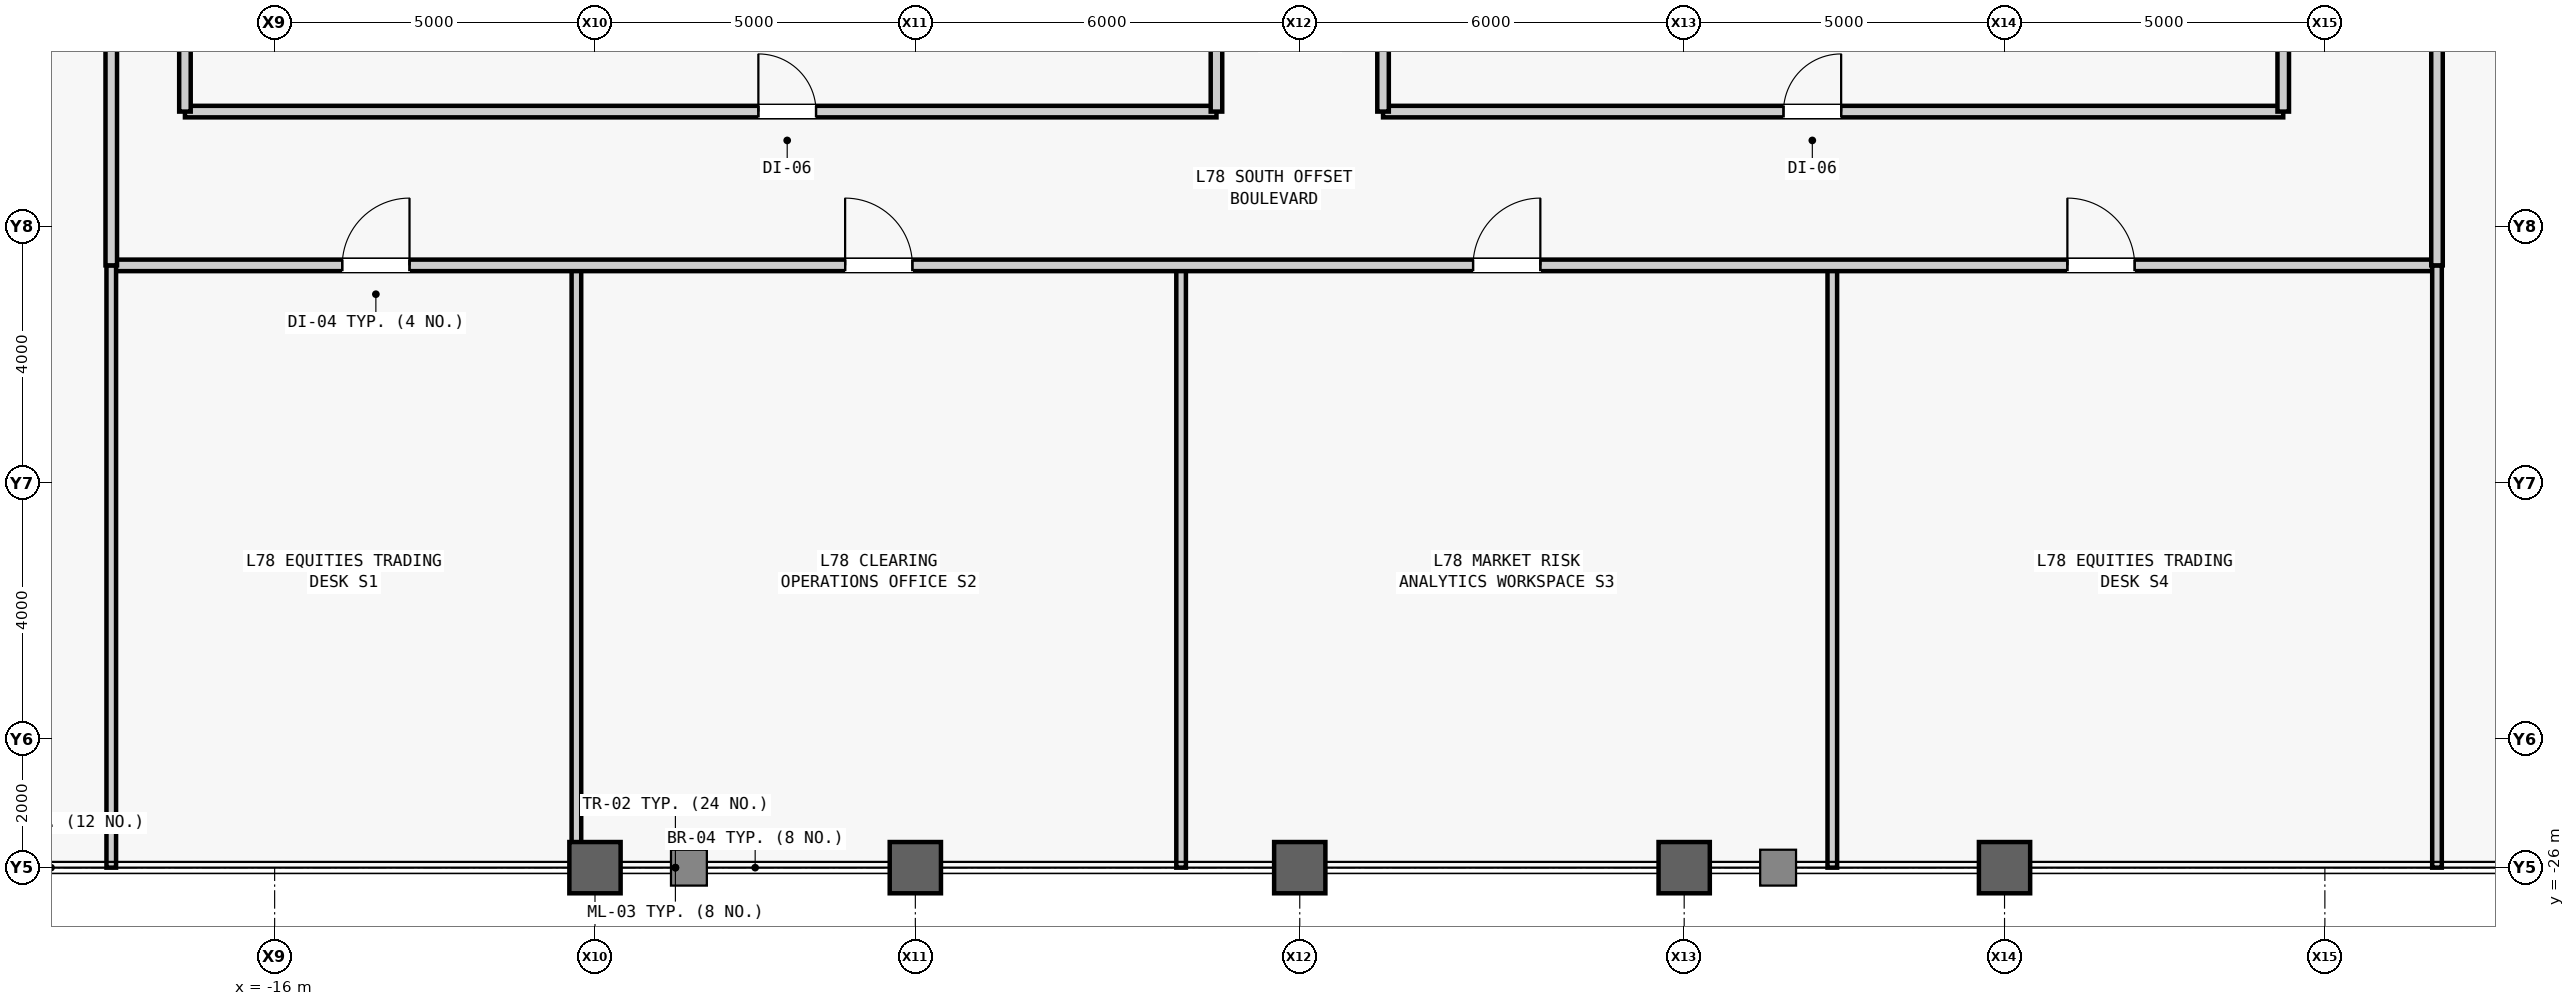
"""IFC4 building model, lengths in metres.
Left out: names, types, materials, properties, quantities, classifications, styles, units other than length and angle.
Written with IfcOpenShell. Run it as: python <this file> out.ifc"""

import sys

from ifc_helpers import new_model, si_unit, direction, frame, frame_2d, origin, origin_2d, place, context, subcontext, project, spatial, rectangle, hollow_rectangle, extrude, source, transform, mapped, element, fill, save


model = new_model("IFC4")
c1 = context("Model", 3, precision=1e-05, world=origin(), true_north=direction((0.0, 1.0)))
c2 = subcontext(c1, "Body", "Model", "MODEL_VIEW")
j1 = project(units=[si_unit("LENGTHUNIT", "METRE"), si_unit("PLANEANGLEUNIT", "RADIAN")], contexts=[c1])
p1 = place(None, origin())
s1 = spatial("IfcSite", under=j1, at=p1, CompositionType="ELEMENT")
p2 = place(p1, origin())
s2 = spatial("IfcBuilding", under=s1, at=p2, CompositionType="ELEMENT")
p3 = place(p2, frame((0.0, 0.0, 330.3)))
s3 = spatial("IfcBuildingStorey", under=s2, at=p3, CompositionType="ELEMENT", Elevation=330.3)
m1 = source(origin(), c2, "Body", "SweptSolid", [
    extrude(hollow_rectangle(XDim=0.8, YDim=0.8, WallThickness=0.045, at=origin_2d()), origin(), (0.0, 0.0, 1.0), 4.0),
])
for number, where, z_axis, x_axis in (
    (1, (-11.0, -26.0, 0.0), (0.0, 0.0, 1.0), (1.0, 0.0, 0.0)),
    (2, (-6.0, -26.0, 0.0), (0.0, 0.0, 1.0), (1.0, 0.0, 0.0)),
    (3, (0.0, -26.0, 0.0), (0.0, 0.0, 1.0), (1.0, 0.0, 0.0)),
    (4, (6.0, -26.0, 0.0), (0.0, 0.0, 1.0), (1.0, 0.0, 0.0)),
    (5, (11.0, -26.0, 0.0), (0.0, 0.0, 1.0), (1.0, 0.0, 0.0)),
):
    element("IfcColumn", number, at=place(p3, frame(where, z_axis=z_axis, x_axis=x_axis)), inside=s3, PredefinedType="COLUMN", context=c2, shape_type="MappedRepresentation", body=[
        mapped(m1, transform((0.0, 0.0, 0.0), scale=1.0)),
    ])
m2 = source(origin(), c2, "Body", "SweptSolid", [
    extrude(rectangle(XDim=16.1, YDim=0.18, at=frame_2d((8.05, 0.0))), origin(), (0.0, 0.0, 1.0), 3.74),
])
p4 = place(p3, frame((-17.4, -14.2, 0.0), z_axis=(0.0, 0.0, 1.0), x_axis=(1.0, 0.0, 0.0)))
e6 = element("IfcWall", 6, at=p4, inside=s3, PredefinedType="PARTITIONING", context=c2, shape_type="MappedRepresentation", body=[
    mapped(m2, transform((0.0, 0.0, 0.0), scale=1.0)),
])
m3 = source(origin(), c2, "Body", "SweptSolid", [
    extrude(rectangle(XDim=0.9, YDim=2.15, at=frame_2d((0.45, 1.075))), frame((0.0, 0.1, 0.0), z_axis=(0.0, -1.0, 0.0), x_axis=(1.0, 0.0, 0.0)), (0.0, 0.0, 1.0), 0.2),
])
p5 = place(p4, frame((8.95, 0.0, 0.0)))
e7 = element("IfcOpeningElement", 7, at=p5, cuts=e6, PredefinedType="OPENING", context=c2, shape_type="MappedRepresentation", body=[
    mapped(m3, transform((0.0, 0.0, 0.0), scale=1.0)),
])
m4 = source(origin(), c2, "Body", "SweptSolid", [
    extrude(rectangle(XDim=4.4, YDim=0.18, at=frame_2d((2.2, 0.0))), origin(), (0.0, 0.0, 1.0), 3.74),
])
p6 = place(p3, frame((-17.4, -14.2, 0.0), z_axis=(0.0, 0.0, 1.0), x_axis=(0.0, 1.0, 0.0)))
e8 = element("IfcWall", 8, at=p6, inside=s3, PredefinedType="PARTITIONING", context=c2, shape_type="MappedRepresentation", body=[
    mapped(m4, transform((0.0, 0.0, 0.0), scale=1.0)),
])
m5 = source(origin(), c2, "Body", "SweptSolid", [
    extrude(rectangle(XDim=3.2, YDim=0.18, at=frame_2d((1.6, 0.0))), origin(), (0.0, 0.0, 1.0), 3.74),
])
p7 = place(p3, frame((-1.3, -14.2, 0.0), z_axis=(0.0, 0.0, 1.0), x_axis=(0.0, 1.0, 0.0)))
e9 = element("IfcWall", 9, at=p7, inside=s3, PredefinedType="PARTITIONING", context=c2, shape_type="MappedRepresentation", body=[
    mapped(m5, transform((0.0, 0.0, 0.0), scale=1.0)),
])
m6 = source(origin(), c2, "Body", "SweptSolid", [
    extrude(rectangle(XDim=14.05, YDim=0.18, at=frame_2d((7.025, 0.0))), origin(), (0.0, 0.0, 1.0), 3.74),
])
p8 = place(p3, frame((1.3, -14.2, 0.0), z_axis=(0.0, 0.0, 1.0), x_axis=(1.0, 0.0, 0.0)))
e10 = element("IfcWall", 10, at=p8, inside=s3, PredefinedType="PARTITIONING", context=c2, shape_type="MappedRepresentation", body=[
    mapped(m6, transform((0.0, 0.0, 0.0), scale=1.0)),
])
p9 = place(p8, frame((6.25, 0.0, 0.0)))
e11 = element("IfcOpeningElement", 11, at=p9, cuts=e10, PredefinedType="OPENING", context=c2, shape_type="MappedRepresentation", body=[
    mapped(m3, transform((0.0, 0.0, 0.0), scale=1.0)),
])
p10 = place(p3, frame((1.3, -14.2, 0.0), z_axis=(0.0, 0.0, 1.0), x_axis=(0.0, 1.0, 0.0)))
e12 = element("IfcWall", 12, at=p10, inside=s3, PredefinedType="PARTITIONING", context=c2, shape_type="MappedRepresentation", body=[
    mapped(m5, transform((0.0, 0.0, 0.0), scale=1.0)),
])
m7 = source(origin(), c2, "Body", "SweptSolid", [
    extrude(rectangle(XDim=3.7, YDim=0.18, at=frame_2d((1.85, 0.0))), origin(), (0.0, 0.0, 1.0), 3.74),
])
p11 = place(p3, frame((15.35, -14.2, 0.0), z_axis=(0.0, 0.0, 1.0), x_axis=(0.0, 1.0, 0.0)))
e13 = element("IfcWall", 13, at=p11, inside=s3, PredefinedType="PARTITIONING", context=c2, shape_type="MappedRepresentation", body=[
    mapped(m7, transform((0.0, 0.0, 0.0), scale=1.0)),
])
m8 = source(origin(), c2, "Body", "SweptSolid", [
    extrude(rectangle(XDim=9.4, YDim=0.15, at=frame_2d((4.7, 0.0))), origin(), (0.0, 0.0, 1.0), 3.124),
])
p12 = place(p3, frame((-11.29, -26.0, 0.0), z_axis=(0.0, 0.0, 1.0), x_axis=(0.0, 1.0, 0.0)))
e14 = element("IfcWall", 14, at=p12, inside=s3, PredefinedType="PARTITIONING", context=c2, shape_type="MappedRepresentation", body=[
    mapped(m8, transform((0.0, 0.0, 0.0), scale=1.0)),
])
m9 = source(origin(), c2, "Body", "SweptSolid", [
    extrude(rectangle(XDim=9.4, YDim=0.15, at=frame_2d((4.7, 0.0))), origin(), (0.0, 0.0, 1.0), 3.74),
])
for number, where, z_axis, x_axis in (
    (15, (-1.852, -26.0, 0.0), (0.0, 0.0, 1.0), (0.0, 1.0, 0.0)),
    (16, (8.312, -26.0, 0.0), (0.0, 0.0, 1.0), (0.0, 1.0, 0.0)),
):
    element("IfcWall", number, at=place(p3, frame(where, z_axis=z_axis, x_axis=x_axis)), inside=s3, PredefinedType="PARTITIONING", context=c2, shape_type="MappedRepresentation", body=[
        mapped(m9, transform((0.0, 0.0, 0.0), scale=1.0)),
    ])
m10 = source(origin(), c2, "Body", "SweptSolid", [
    extrude(rectangle(XDim=36.3, YDim=0.18, at=frame_2d((18.15, 0.0))), origin(), (0.0, 0.0, 1.0), 3.74),
])
p13 = place(p3, frame((-18.55, -16.6, 0.0), z_axis=(0.0, 0.0, 1.0), x_axis=(1.0, 0.0, 0.0)))
e17 = element("IfcWall", 17, at=p13, inside=s3, PredefinedType="PARTITIONING", context=c2, shape_type="MappedRepresentation", body=[
    mapped(m10, transform((0.0, 0.0, 0.0), scale=1.0)),
])
m11 = source(origin(), c2, "Body", "SweptSolid", [
    extrude(rectangle(XDim=1.05, YDim=2.2, at=frame_2d((0.525, 1.1))), frame((0.0, 0.1, 0.0), z_axis=(0.0, -1.0, 0.0), x_axis=(1.0, 0.0, 0.0)), (0.0, 0.0, 1.0), 0.2),
])
p14 = place(p13, frame((3.605, 0.0, 0.0)))
e18 = element("IfcOpeningElement", 18, at=p14, cuts=e17, PredefinedType="OPENING", context=c2, shape_type="MappedRepresentation", body=[
    mapped(m11, transform((0.0, 0.0, 0.0), scale=1.0)),
])
p15 = place(p13, frame((11.454, 0.0, 0.0)))
e19 = element("IfcOpeningElement", 19, at=p15, cuts=e17, PredefinedType="OPENING", context=c2, shape_type="MappedRepresentation", body=[
    mapped(m11, transform((0.0, 0.0, 0.0), scale=1.0)),
])
p16 = place(p13, frame((21.255, 0.0, 0.0)))
e20 = element("IfcOpeningElement", 20, at=p16, cuts=e17, PredefinedType="OPENING", context=c2, shape_type="MappedRepresentation", body=[
    mapped(m11, transform((0.0, 0.0, 0.0), scale=1.0)),
])
p17 = place(p13, frame((30.531, 0.0, 0.0)))
e21 = element("IfcOpeningElement", 21, at=p17, cuts=e17, PredefinedType="OPENING", context=c2, shape_type="MappedRepresentation", body=[
    mapped(m11, transform((0.0, 0.0, 0.0), scale=1.0)),
])
for number, where, z_axis, x_axis in (
    (22, (-18.55, -26.0, 0.0), (0.0, 0.0, 1.0), (0.0, 1.0, 0.0)),
    (23, (17.75, -26.0, 0.0), (0.0, 0.0, 1.0), (0.0, 1.0, 0.0)),
):
    element("IfcWall", number, at=place(p3, frame(where, z_axis=z_axis, x_axis=x_axis)), inside=s3, PredefinedType="PARTITIONING", context=c2, shape_type="MappedRepresentation", body=[
        mapped(m9, transform((0.0, 0.0, 0.0), scale=1.0)),
    ])
m12 = source(origin(), c2, "Body", "SweptSolid", [
    extrude(rectangle(XDim=36.6, YDim=0.18, at=frame_2d((18.3, 0.0))), origin(), (0.0, 0.0, 1.0), 3.74),
])
p18 = place(p3, frame((-18.55, -16.6, 0.0), z_axis=(0.0, 0.0, 1.0), x_axis=(0.0, 1.0, 0.0)))
e24 = element("IfcWall", 24, at=p18, inside=s3, PredefinedType="PARTITIONING", context=c2, shape_type="MappedRepresentation", body=[
    mapped(m12, transform((0.0, 0.0, 0.0), scale=1.0)),
])
m13 = source(origin(), c2, "Body", "SweptSolid", [
    extrude(rectangle(XDim=0.95, YDim=2.15, at=frame_2d((0.475, 1.075))), frame((0.0, 0.1, 0.0), z_axis=(0.0, -1.0, 0.0), x_axis=(1.0, 0.0, 0.0)), (0.0, 0.0, 1.0), 0.2),
])
p19 = place(p18, frame((16.825, 0.0, 0.0)))
e25 = element("IfcOpeningElement", 25, at=p19, cuts=e24, PredefinedType="OPENING", context=c2, shape_type="MappedRepresentation", body=[
    mapped(m13, transform((0.0, 0.0, 0.0), scale=1.0)),
])
p20 = place(p3, frame((17.75, -16.6, 0.0), z_axis=(0.0, 0.0, 1.0), x_axis=(0.0, 1.0, 0.0)))
e26 = element("IfcWall", 26, at=p20, inside=s3, PredefinedType="PARTITIONING", context=c2, shape_type="MappedRepresentation", body=[
    mapped(m12, transform((0.0, 0.0, 0.0), scale=1.0)),
])
p21 = place(p20, frame((15.825, 0.0, 0.0)))
e27 = element("IfcOpeningElement", 27, at=p21, cuts=e26, PredefinedType="OPENING", context=c2, shape_type="MappedRepresentation", body=[
    mapped(m13, transform((0.0, 0.0, 0.0), scale=1.0)),
])
m14 = source(origin(), c2, "Body", "SweptSolid", [
    extrude(rectangle(XDim=0.9, YDim=2.15, at=frame_2d((0.45, 1.075))), frame((0.0, 0.025, 0.0), z_axis=(0.0, -1.0, 0.0), x_axis=(1.0, 0.0, 0.0)), (0.0, 0.0, 1.0), 0.05),
])
p22 = place(p5, origin())
e28 = element("IfcDoor", 28, at=p22, inside=s3, OperationType="SINGLE_SWING_LEFT", PredefinedType="DOOR", context=c2, shape_type="MappedRepresentation", body=[
    mapped(m14, transform((0.0, 0.0, 0.0), scale=1.0)),
])
fill(e7, e28)
p23 = place(p9, origin())
e29 = element("IfcDoor", 29, at=p23, inside=s3, OperationType="SINGLE_SWING_RIGHT", PredefinedType="DOOR", context=c2, shape_type="MappedRepresentation", body=[
    mapped(m14, transform((0.0, 0.0, 0.0), scale=1.0)),
])
fill(e11, e29)
m15 = source(origin(), c2, "Body", "SweptSolid", [
    extrude(rectangle(XDim=1.05, YDim=2.2, at=frame_2d((0.525, 1.1))), frame((0.0, 0.025, 0.0), z_axis=(0.0, -1.0, 0.0), x_axis=(1.0, 0.0, 0.0)), (0.0, 0.0, 1.0), 0.05),
])
p24 = place(p14, origin())
e30 = element("IfcDoor", 30, at=p24, inside=s3, OperationType="SINGLE_SWING_RIGHT", PredefinedType="DOOR", context=c2, shape_type="MappedRepresentation", body=[
    mapped(m15, transform((0.0, 0.0, 0.0), scale=1.0)),
])
fill(e18, e30)
p25 = place(p15, origin())
e31 = element("IfcDoor", 31, at=p25, inside=s3, OperationType="SINGLE_SWING_LEFT", PredefinedType="DOOR", context=c2, shape_type="MappedRepresentation", body=[
    mapped(m15, transform((0.0, 0.0, 0.0), scale=1.0)),
])
fill(e19, e31)
p26 = place(p16, origin())
e32 = element("IfcDoor", 32, at=p26, inside=s3, OperationType="SINGLE_SWING_RIGHT", PredefinedType="DOOR", context=c2, shape_type="MappedRepresentation", body=[
    mapped(m15, transform((0.0, 0.0, 0.0), scale=1.0)),
])
fill(e20, e32)
p27 = place(p17, origin())
e33 = element("IfcDoor", 33, at=p27, inside=s3, OperationType="SINGLE_SWING_LEFT", PredefinedType="DOOR", context=c2, shape_type="MappedRepresentation", body=[
    mapped(m15, transform((0.0, 0.0, 0.0), scale=1.0)),
])
fill(e21, e33)
save(model, sys.argv[1])
